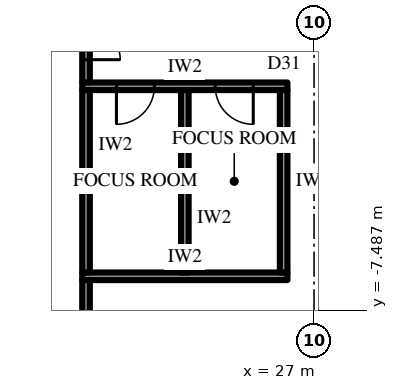
"""IFC4 building model, lengths in metres.
Left out: names, types, materials, properties, quantities, classifications, styles, units other than length and angle.
Written with IfcOpenShell. Run it as: python <this file> out.ifc"""

import sys

from ifc_helpers import new_model, si_unit, direction, frame, frame_2d, origin, place, context, subcontext, project, spatial, rectangle, extrude, element, fill, save


model = new_model("IFC4")
c1 = context("Model", 3, precision=1e-05, world=origin(), true_north=direction((0.0, 1.0)))
c2 = subcontext(c1, "Body", "Model", "MODEL_VIEW")
j1 = project(units=[si_unit("LENGTHUNIT", "METRE"), si_unit("PLANEANGLEUNIT", "RADIAN")], contexts=[c1])
p1 = place(None, origin())
s1 = spatial("IfcSite", under=j1, at=p1, CompositionType="ELEMENT")
p2 = place(p1, origin())
s2 = spatial("IfcBuilding", under=s1, at=p2, CompositionType="ELEMENT")
p3 = place(p2, frame((0.0, 0.0, 48.7)))
s3 = spatial("IfcBuildingStorey", under=s2, at=p3, CompositionType="ELEMENT", Elevation=48.7)
p4 = place(p3, frame((21.232, -30.925, 0.0), z_axis=(0.0, 0.0, 1.0), x_axis=(0.499999163675, 0.866025886636, 0.0)))
e1 = element("IfcWall", 1, at=p4, inside=s3, PredefinedType="SOLIDWALL", context=c2, shape_type="SweptSolid", body=[
    extrude(rectangle(XDim=32.332, YDim=0.3, at=frame_2d((16.166, 0.0))), origin(), (0.0, 0.0, 1.0), 2.7),
])
p5 = place(p4, frame((1.319, 0.0, 0.6)))
e2 = element("IfcOpeningElement", 2, at=p5, cuts=e1, PredefinedType="OPENING", context=c2, shape_type="SweptSolid", body=[
    extrude(rectangle(XDim=2.75, YDim=1.85, at=frame_2d((1.375, 0.925))), frame((0.0, 0.16, 0.0), z_axis=(0.0, -1.0, 0.0), x_axis=(1.0, 0.0, 0.0)), (0.0, 0.0, 1.0), 0.32),
])
p6 = place(p4, frame((6.708, 0.0, 0.6)))
e3 = element("IfcOpeningElement", 3, at=p6, cuts=e1, PredefinedType="OPENING", context=c2, shape_type="SweptSolid", body=[
    extrude(rectangle(XDim=2.75, YDim=1.85, at=frame_2d((1.375, 0.925))), frame((0.0, 0.16, 0.0), z_axis=(0.0, -1.0, 0.0), x_axis=(1.0, 0.0, 0.0)), (0.0, 0.0, 1.0), 0.32),
])
p7 = place(p4, frame((12.872, 0.0, 0.0)))
e4 = element("IfcOpeningElement", 4, at=p7, cuts=e1, PredefinedType="OPENING", context=c2, shape_type="SweptSolid", body=[
    extrude(rectangle(XDim=1.2, YDim=2.4, at=frame_2d((0.6, 1.2))), frame((0.0, 0.16, 0.0), z_axis=(0.0, -1.0, 0.0), x_axis=(1.0, 0.0, 0.0)), (0.0, 0.0, 1.0), 0.32),
])
p8 = place(p4, frame((17.485, 0.0, 0.6)))
e5 = element("IfcOpeningElement", 5, at=p8, cuts=e1, PredefinedType="OPENING", context=c2, shape_type="SweptSolid", body=[
    extrude(rectangle(XDim=2.75, YDim=1.85, at=frame_2d((1.375, 0.925))), frame((0.0, 0.16, 0.0), z_axis=(0.0, -1.0, 0.0), x_axis=(1.0, 0.0, 0.0)), (0.0, 0.0, 1.0), 0.32),
])
p9 = place(p4, frame((22.874, 0.0, 0.6)))
e6 = element("IfcOpeningElement", 6, at=p9, cuts=e1, PredefinedType="OPENING", context=c2, shape_type="SweptSolid", body=[
    extrude(rectangle(XDim=2.75, YDim=1.85, at=frame_2d((1.375, 0.925))), frame((0.0, 0.16, 0.0), z_axis=(0.0, -1.0, 0.0), x_axis=(1.0, 0.0, 0.0)), (0.0, 0.0, 1.0), 0.32),
])
p10 = place(p4, frame((28.262, 0.0, 0.6)))
e7 = element("IfcOpeningElement", 7, at=p10, cuts=e1, PredefinedType="OPENING", context=c2, shape_type="SweptSolid", body=[
    extrude(rectangle(XDim=2.75, YDim=1.85, at=frame_2d((1.375, 0.925))), frame((0.0, 0.16, 0.0), z_axis=(0.0, -1.0, 0.0), x_axis=(1.0, 0.0, 0.0)), (0.0, 0.0, 1.0), 0.32),
])
p11 = place(p3, frame((20.9, -1.6, 0.0), z_axis=(0.0, 0.0, 1.0), x_axis=(1.0, 0.0, 0.0)))
e8 = element("IfcWall", 8, at=p11, inside=s3, PredefinedType="PARTITIONING", context=c2, shape_type="SweptSolid", body=[
    extrude(rectangle(XDim=5.4, YDim=0.2, at=frame_2d((2.7, 0.0))), origin(), (0.0, 0.0, 1.0), 4.0),
])
p12 = place(p11, frame((0.9, 0.0, 0.0)))
e9 = element("IfcOpeningElement", 9, at=p12, cuts=e8, PredefinedType="OPENING", context=c2, shape_type="SweptSolid", body=[
    extrude(rectangle(XDim=1.0, YDim=2.2, at=frame_2d((0.5, 1.1))), frame((0.0, 0.11, 0.0), z_axis=(0.0, -1.0, 0.0), x_axis=(1.0, 0.0, 0.0)), (0.0, 0.0, 1.0), 0.22),
])
p13 = place(p11, frame((3.5, 0.0, 0.0)))
e10 = element("IfcOpeningElement", 10, at=p13, cuts=e8, PredefinedType="OPENING", context=c2, shape_type="SweptSolid", body=[
    extrude(rectangle(XDim=1.0, YDim=2.2, at=frame_2d((0.5, 1.1))), frame((0.0, 0.11, 0.0), z_axis=(0.0, -1.0, 0.0), x_axis=(1.0, 0.0, 0.0)), (0.0, 0.0, 1.0), 0.22),
])
p14 = place(p3, frame((20.9, -6.6, 0.0), z_axis=(0.0, 0.0, 1.0), x_axis=(1.0, 0.0, 0.0)))
e11 = element("IfcWall", 11, at=p14, inside=s3, PredefinedType="PARTITIONING", context=c2, shape_type="SweptSolid", body=[
    extrude(rectangle(XDim=5.4, YDim=0.2, at=frame_2d((2.7, 0.0))), origin(), (0.0, 0.0, 1.0), 4.0),
])
for number, where, z_axis, x_axis in (
    (12, (21.0, -1.7, 0.0), (0.0, 0.0, 1.0), (0.0, -1.0, 0.0)),
    (13, (23.6, -1.7, 0.0), (0.0, 0.0, 1.0), (0.0, -1.0, 0.0)),
    (14, (26.2, -1.7, 0.0), (0.0, 0.0, 1.0), (0.0, -1.0, 0.0)),
):
    element("IfcWall", number, at=place(p3, frame(where, z_axis=z_axis, x_axis=x_axis)), inside=s3, PredefinedType="PARTITIONING", context=c2, shape_type="SweptSolid", body=[
        extrude(rectangle(XDim=4.8, YDim=0.2, at=frame_2d((2.4, 0.0))), origin(), (0.0, 0.0, 1.0), 4.0),
    ])
p15 = place(p3, frame((21.0, -6.701, 0.0), z_axis=(0.0, 0.0, 1.0), x_axis=(0.0, -1.0, 0.0)))
e15 = element("IfcWall", 15, at=p15, inside=s3, PredefinedType="PARTITIONING", context=c2, shape_type="SweptSolid", body=[
    extrude(rectangle(XDim=5.599, YDim=0.2, at=frame_2d((2.8, 0.0))), origin(), (0.0, 0.0, 1.0), 4.0),
])
p16 = place(p3, frame((21.0, 1.499, 0.0), z_axis=(0.0, 0.0, 1.0), x_axis=(0.0, -1.0, 0.0)))
e16 = element("IfcWall", 16, at=p16, inside=s3, PredefinedType="PARTITIONING", context=c2, shape_type="SweptSolid", body=[
    extrude(rectangle(XDim=2.998, YDim=0.2, at=frame_2d((1.499, 0.0))), origin(), (0.0, 0.0, 1.0), 4.0),
])
p17 = place(p16, frame((0.599, 0.0, 0.0)))
e17 = element("IfcOpeningElement", 17, at=p17, cuts=e16, PredefinedType="OPENING", context=c2, shape_type="SweptSolid", body=[
    extrude(rectangle(XDim=1.8, YDim=2.4, at=frame_2d((0.9, 1.2))), frame((0.0, 0.11, 0.0), z_axis=(0.0, -1.0, 0.0), x_axis=(1.0, 0.0, 0.0)), (0.0, 0.0, 1.0), 0.22),
])
p18 = place(p12, frame((1.0, 0.0, 0.0), z_axis=(0.0, 0.0, 1.0), x_axis=(-1.0, 0.0, 0.0)))
e18 = element("IfcDoor", 18, at=p18, inside=s3, OperationType="SINGLE_SWING_LEFT", PredefinedType="DOOR", context=c2, shape_type="SweptSolid", body=[
    extrude(rectangle(XDim=1.0, YDim=2.2, at=frame_2d((0.5, 1.1))), frame((0.0, 0.025, 0.0), z_axis=(0.0, -1.0, 0.0), x_axis=(1.0, 0.0, 0.0)), (0.0, 0.0, 1.0), 0.05),
])
fill(e9, e18)
p19 = place(p13, frame((1.0, 0.0, 0.0), z_axis=(0.0, 0.0, 1.0), x_axis=(-1.0, 0.0, 0.0)))
e19 = element("IfcDoor", 19, at=p19, inside=s3, OperationType="SINGLE_SWING_RIGHT", PredefinedType="DOOR", context=c2, shape_type="SweptSolid", body=[
    extrude(rectangle(XDim=1.0, YDim=2.2, at=frame_2d((0.5, 1.1))), frame((0.0, 0.025, 0.0), z_axis=(0.0, -1.0, 0.0), x_axis=(1.0, 0.0, 0.0)), (0.0, 0.0, 1.0), 0.05),
])
fill(e10, e19)
p20 = place(p17, origin())
e20 = element("IfcDoor", 20, at=p20, inside=s3, OperationType="DOUBLE_DOOR_SINGLE_SWING", PredefinedType="DOOR", context=c2, shape_type="SweptSolid", body=[
    extrude(rectangle(XDim=1.8, YDim=2.4, at=frame_2d((0.9, 1.2))), frame((0.0, 0.025, 0.0), z_axis=(0.0, -1.0, 0.0), x_axis=(1.0, 0.0, 0.0)), (0.0, 0.0, 1.0), 0.05),
])
fill(e17, e20)
save(model, sys.argv[1])
